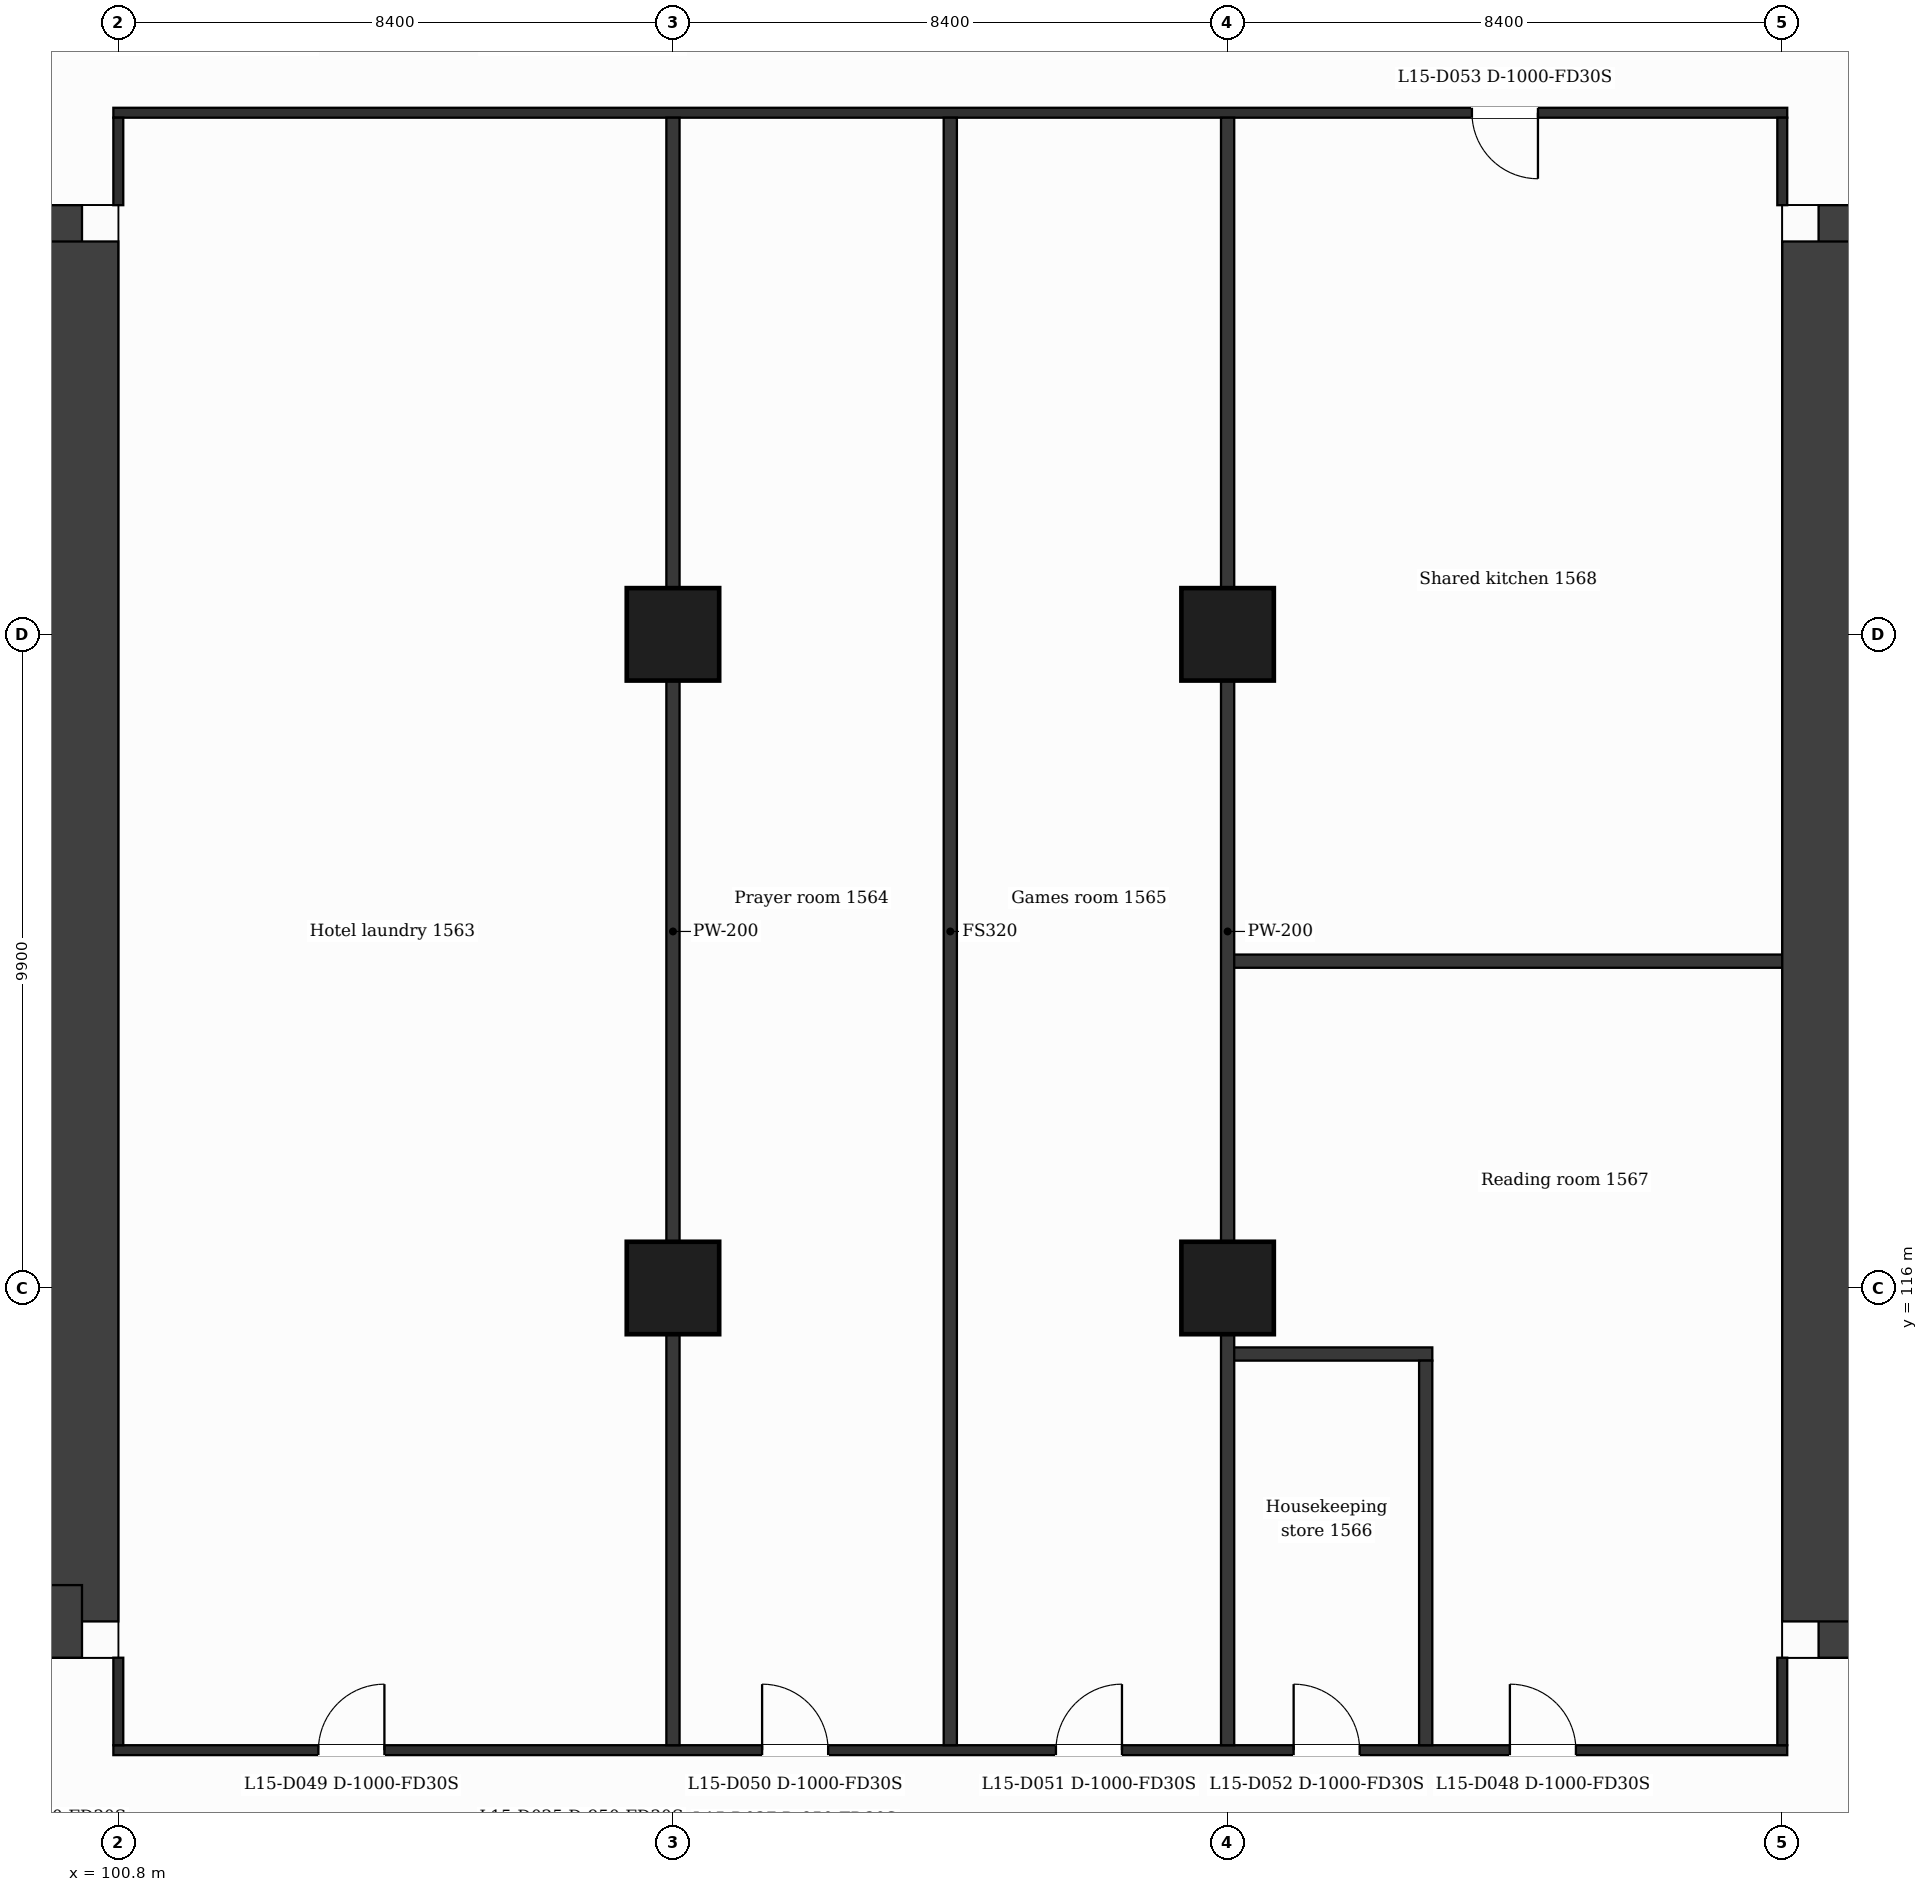
"""IFC4 building model, lengths in metres.
Left out: names, types, materials, properties, quantities, classifications, styles, units other than length and angle.
Written with IfcOpenShell. Run it as: python <this file> out.ifc"""

import sys

from ifc_helpers import new_model, si_unit, direction, frame, frame_2d, origin, origin_2d, place, context, subcontext, project, spatial, rectangle, extrude, element, fill, save


model = new_model("IFC4")
c1 = context("Model", 3, precision=1e-05, world=origin(), true_north=direction((0.0, 1.0)))
c2 = subcontext(c1, "Body", "Model", "MODEL_VIEW")
j1 = project(units=[si_unit("LENGTHUNIT", "METRE"), si_unit("PLANEANGLEUNIT", "RADIAN")], contexts=[c1])
p1 = place(None, origin())
s1 = spatial("IfcSite", under=j1, at=p1, CompositionType="ELEMENT")
p2 = place(p1, origin())
s2 = spatial("IfcBuilding", under=s1, at=p2, CompositionType="ELEMENT")
p3 = place(p2, frame((0.0, 0.0, 70.5)))
s3 = spatial("IfcBuildingStorey", under=s2, at=p3, CompositionType="ELEMENT", Elevation=70.5)
p4 = place(p3, frame((89.112, 131.85, 0.0), z_axis=(0.0, 0.0, 1.0), x_axis=(1.0, 0.0, 0.0)))
e1 = element("IfcWall", 1, at=p4, inside=s3, PredefinedType="SHEAR", context=c2, shape_type="SweptSolid", body=[
    extrude(rectangle(XDim=11.138, YDim=1.1, at=frame_2d((5.569, 0.0))), origin(), (0.0, 0.0, 1.0), 3.5),
])
p5 = place(p4, frame((6.552, 0.0, 0.0)))
e2 = element("IfcOpeningElement", 2, at=p5, cuts=e1, PredefinedType="OPENING", context=c2, shape_type="SweptSolid", body=[
    extrude(rectangle(XDim=1.2, YDim=2.1, at=frame_2d((0.6, 1.05))), frame((0.0, 0.56, 0.0), z_axis=(0.0, -1.0, 0.0), x_axis=(1.0, 0.0, 0.0)), (0.0, 0.0, 1.0), 1.12),
])
p6 = place(p3, frame((100.25, 131.85, 0.0), z_axis=(0.0, 0.0, 1.0), x_axis=(0.0, -1.0, 0.0)))
e3 = element("IfcWall", 3, at=p6, inside=s3, PredefinedType="SHEAR", context=c2, shape_type="SweptSolid", body=[
    extrude(rectangle(XDim=20.9, YDim=1.1, at=frame_2d((10.45, 0.0))), origin(), (0.0, 0.0, 1.0), 3.5),
])
p7 = place(p3, frame((100.25, 110.95, 0.0), z_axis=(0.0, 0.0, 1.0), x_axis=(-1.0, 0.0, 0.0)))
e4 = element("IfcWall", 4, at=p7, inside=s3, PredefinedType="SHEAR", context=c2, shape_type="SweptSolid", body=[
    extrude(rectangle(XDim=13.952, YDim=1.1, at=frame_2d((6.976, 0.0))), origin(), (0.0, 0.0, 1.0), 3.5),
])
p8 = place(p7, frame((5.748, 0.0, 0.0)))
e5 = element("IfcOpeningElement", 5, at=p8, cuts=e4, PredefinedType="OPENING", context=c2, shape_type="SweptSolid", body=[
    extrude(rectangle(XDim=1.4, YDim=2.1, at=frame_2d((0.7, 1.05))), frame((0.0, 0.56, 0.0), z_axis=(0.0, -1.0, 0.0), x_axis=(1.0, 0.0, 0.0)), (0.0, 0.0, 1.0), 1.12),
])
p9 = place(p3, frame((126.55, 131.85, 0.0), z_axis=(0.0, 0.0, 1.0), x_axis=(1.0, 0.0, 0.0)))
e6 = element("IfcWall", 6, at=p9, inside=s3, PredefinedType="SHEAR", context=c2, shape_type="SweptSolid", body=[
    extrude(rectangle(XDim=11.138, YDim=1.1, at=frame_2d((5.569, 0.0))), origin(), (0.0, 0.0, 1.0), 3.5),
])
p10 = place(p9, frame((3.386, 0.0, 0.0)))
e7 = element("IfcOpeningElement", 7, at=p10, cuts=e6, PredefinedType="OPENING", context=c2, shape_type="SweptSolid", body=[
    extrude(rectangle(XDim=1.2, YDim=2.1, at=frame_2d((0.6, 1.05))), frame((0.0, 0.56, 0.0), z_axis=(0.0, -1.0, 0.0), x_axis=(1.0, 0.0, 0.0)), (0.0, 0.0, 1.0), 1.12),
])
p11 = place(p3, frame((140.502, 110.95, 0.0), z_axis=(0.0, 0.0, 1.0), x_axis=(-1.0, 0.0, 0.0)))
e8 = element("IfcWall", 8, at=p11, inside=s3, PredefinedType="SHEAR", context=c2, shape_type="SweptSolid", body=[
    extrude(rectangle(XDim=13.952, YDim=1.1, at=frame_2d((6.976, 0.0))), origin(), (0.0, 0.0, 1.0), 3.5),
])
p12 = place(p11, frame((6.804, 0.0, 0.0)))
e9 = element("IfcOpeningElement", 9, at=p12, cuts=e8, PredefinedType="OPENING", context=c2, shape_type="SweptSolid", body=[
    extrude(rectangle(XDim=1.4, YDim=2.1, at=frame_2d((0.7, 1.05))), frame((0.0, 0.56, 0.0), z_axis=(0.0, -1.0, 0.0), x_axis=(1.0, 0.0, 0.0)), (0.0, 0.0, 1.0), 1.12),
])
p13 = place(p3, frame((126.55, 110.95, 0.0), z_axis=(0.0, 0.0, 1.0), x_axis=(0.0, 1.0, 0.0)))
e10 = element("IfcWall", 10, at=p13, inside=s3, PredefinedType="SHEAR", context=c2, shape_type="SweptSolid", body=[
    extrude(rectangle(XDim=20.9, YDim=1.1, at=frame_2d((10.45, 0.0))), origin(), (0.0, 0.0, 1.0), 3.5),
])
for number, where, z_axis, x_axis in (
    (11, (109.2, 116.0, 0.0), (0.0, 0.0, 1.0), (1.0, 0.0, 0.0)),
    (12, (117.6, 116.0, 0.0), (0.0, 0.0, 1.0), (1.0, 0.0, 0.0)),
    (13, (109.2, 125.9, 0.0), (0.0, 0.0, 1.0), (1.0, 0.0, 0.0)),
    (14, (117.6, 125.9, 0.0), (0.0, 0.0, 1.0), (1.0, 0.0, 0.0)),
):
    element("IfcColumn", number, at=place(p3, frame(where, z_axis=z_axis, x_axis=x_axis)), inside=s3, PredefinedType="COLUMN", context=c2, shape_type="SweptSolid", body=[
        extrude(rectangle(XDim=1.4, YDim=1.4, at=origin_2d()), origin(), (0.0, 0.0, 1.0), 3.5),
    ])
p14 = place(p3, frame((100.725, 109.0, 0.0), z_axis=(0.0, 0.0, 1.0), x_axis=(1.0, 0.0, 0.0)))
e15 = element("IfcWall", 15, at=p14, inside=s3, PredefinedType="PARTITIONING", context=c2, shape_type="SweptSolid", body=[
    extrude(rectangle(XDim=25.35, YDim=0.15, at=frame_2d((12.675, 0.0))), origin(), (0.0, 0.0, 1.0), 3.18),
])
p15 = place(p14, frame((21.15, 0.0, 0.0)))
e16 = element("IfcOpeningElement", 16, at=p15, cuts=e15, PredefinedType="OPENING", context=c2, shape_type="SweptSolid", body=[
    extrude(rectangle(XDim=1.0, YDim=2.1, at=frame_2d((0.5, 1.05))), frame((0.0, 0.085, 0.0), z_axis=(0.0, -1.0, 0.0), x_axis=(1.0, 0.0, 0.0)), (0.0, 0.0, 1.0), 0.17),
])
p16 = place(p14, frame((3.105, 0.0, 0.0)))
e17 = element("IfcOpeningElement", 17, at=p16, cuts=e15, PredefinedType="OPENING", context=c2, shape_type="SweptSolid", body=[
    extrude(rectangle(XDim=1.0, YDim=2.1, at=frame_2d((0.5, 1.05))), frame((0.0, 0.085, 0.0), z_axis=(0.0, -1.0, 0.0), x_axis=(1.0, 0.0, 0.0)), (0.0, 0.0, 1.0), 0.17),
])
p17 = place(p14, frame((9.825, 0.0, 0.0)))
e18 = element("IfcOpeningElement", 18, at=p17, cuts=e15, PredefinedType="OPENING", context=c2, shape_type="SweptSolid", body=[
    extrude(rectangle(XDim=1.0, YDim=2.1, at=frame_2d((0.5, 1.05))), frame((0.0, 0.085, 0.0), z_axis=(0.0, -1.0, 0.0), x_axis=(1.0, 0.0, 0.0)), (0.0, 0.0, 1.0), 0.17),
])
p18 = place(p14, frame((14.275, 0.0, 0.0)))
e19 = element("IfcOpeningElement", 19, at=p18, cuts=e15, PredefinedType="OPENING", context=c2, shape_type="SweptSolid", body=[
    extrude(rectangle(XDim=1.0, YDim=2.1, at=frame_2d((0.5, 1.05))), frame((0.0, 0.085, 0.0), z_axis=(0.0, -1.0, 0.0), x_axis=(1.0, 0.0, 0.0)), (0.0, 0.0, 1.0), 0.17),
])
p19 = place(p14, frame((17.875, 0.0, 0.0)))
e20 = element("IfcOpeningElement", 20, at=p19, cuts=e15, PredefinedType="OPENING", context=c2, shape_type="SweptSolid", body=[
    extrude(rectangle(XDim=1.0, YDim=2.1, at=frame_2d((0.5, 1.05))), frame((0.0, 0.085, 0.0), z_axis=(0.0, -1.0, 0.0), x_axis=(1.0, 0.0, 0.0)), (0.0, 0.0, 1.0), 0.17),
])
p20 = place(p3, frame((117.6, 115.0, 0.0), z_axis=(0.0, 0.0, 1.0), x_axis=(1.0, 0.0, 0.0)))
e21 = element("IfcWall", 21, at=p20, inside=s3, PredefinedType="PARTITIONING", context=c2, shape_type="SweptSolid", body=[
    extrude(rectangle(XDim=3.1, YDim=0.2, at=frame_2d((1.55, 0.0))), origin(), (0.0, 0.0, 1.0), 3.18),
])
p21 = place(p3, frame((117.6, 120.95, 0.0), z_axis=(0.0, 0.0, 1.0), x_axis=(1.0, 0.0, 0.0)))
e22 = element("IfcWall", 22, at=p21, inside=s3, PredefinedType="PARTITIONING", context=c2, shape_type="SweptSolid", body=[
    extrude(rectangle(XDim=8.4, YDim=0.2, at=frame_2d((4.2, 0.0))), origin(), (0.0, 0.0, 1.0), 3.18),
])
p22 = place(p3, frame((100.725, 133.8, 0.0), z_axis=(0.0, 0.0, 1.0), x_axis=(1.0, 0.0, 0.0)))
e23 = element("IfcWall", 23, at=p22, inside=s3, PredefinedType="PARTITIONING", context=c2, shape_type="SweptSolid", body=[
    extrude(rectangle(XDim=25.35, YDim=0.15, at=frame_2d((12.675, 0.0))), origin(), (0.0, 0.0, 1.0), 3.18),
])
p23 = place(p22, frame((20.575, 0.0, 0.0)))
e24 = element("IfcOpeningElement", 24, at=p23, cuts=e23, PredefinedType="OPENING", context=c2, shape_type="SweptSolid", body=[
    extrude(rectangle(XDim=1.0, YDim=2.1, at=frame_2d((0.5, 1.05))), frame((0.0, 0.085, 0.0), z_axis=(0.0, -1.0, 0.0), x_axis=(1.0, 0.0, 0.0)), (0.0, 0.0, 1.0), 0.17),
])
p24 = place(p3, frame((100.8, 109.075, 0.0), z_axis=(0.0, 0.0, 1.0), x_axis=(0.0, 1.0, 0.0)))
e25 = element("IfcWall", 25, at=p24, inside=s3, PredefinedType="PARTITIONING", context=c2, shape_type="SweptSolid", body=[
    extrude(rectangle(XDim=1.325, YDim=0.15, at=frame_2d((0.663, 0.0))), origin(), (0.0, 0.0, 1.0), 3.18),
])
p25 = place(p3, frame((100.8, 132.4, 0.0), z_axis=(0.0, 0.0, 1.0), x_axis=(0.0, 1.0, 0.0)))
e26 = element("IfcWall", 26, at=p25, inside=s3, PredefinedType="PARTITIONING", context=c2, shape_type="SweptSolid", body=[
    extrude(rectangle(XDim=1.325, YDim=0.15, at=frame_2d((0.663, 0.0))), origin(), (0.0, 0.0, 1.0), 3.18),
])
for number, where, z_axis, x_axis in (
    (27, (109.2, 109.075, 0.0), (0.0, 0.0, 1.0), (0.0, 1.0, 0.0)),
    (28, (113.4, 109.075, 0.0), (0.0, 0.0, 1.0), (0.0, 1.0, 0.0)),
    (29, (117.6, 109.075, 0.0), (0.0, 0.0, 1.0), (0.0, 1.0, 0.0)),
):
    element("IfcWall", number, at=place(p3, frame(where, z_axis=z_axis, x_axis=x_axis)), inside=s3, PredefinedType="PARTITIONING", context=c2, shape_type="SweptSolid", body=[
        extrude(rectangle(XDim=24.65, YDim=0.2, at=frame_2d((12.325, 0.0))), origin(), (0.0, 0.0, 1.0), 3.18),
    ])
p26 = place(p3, frame((120.6, 109.075, 0.0), z_axis=(0.0, 0.0, 1.0), x_axis=(0.0, 1.0, 0.0)))
e30 = element("IfcWall", 30, at=p26, inside=s3, PredefinedType="PARTITIONING", context=c2, shape_type="SweptSolid", body=[
    extrude(rectangle(XDim=5.825, YDim=0.2, at=frame_2d((2.913, 0.0))), origin(), (0.0, 0.0, 1.0), 3.18),
])
p27 = place(p3, frame((126.0, 109.075, 0.0), z_axis=(0.0, 0.0, 1.0), x_axis=(0.0, 1.0, 0.0)))
e31 = element("IfcWall", 31, at=p27, inside=s3, PredefinedType="PARTITIONING", context=c2, shape_type="SweptSolid", body=[
    extrude(rectangle(XDim=1.325, YDim=0.15, at=frame_2d((0.663, 0.0))), origin(), (0.0, 0.0, 1.0), 3.18),
])
p28 = place(p3, frame((126.0, 132.4, 0.0), z_axis=(0.0, 0.0, 1.0), x_axis=(0.0, 1.0, 0.0)))
e32 = element("IfcWall", 32, at=p28, inside=s3, PredefinedType="PARTITIONING", context=c2, shape_type="SweptSolid", body=[
    extrude(rectangle(XDim=1.325, YDim=0.15, at=frame_2d((0.663, 0.0))), origin(), (0.0, 0.0, 1.0), 3.18),
])
p29 = place(p15, origin())
e33 = element("IfcDoor", 33, at=p29, inside=s3, OperationType="SINGLE_SWING_LEFT", PredefinedType="DOOR", context=c2, shape_type="SweptSolid", body=[
    extrude(rectangle(XDim=1.0, YDim=2.1, at=frame_2d((0.5, 1.05))), frame((0.0, 0.025, 0.0), z_axis=(0.0, -1.0, 0.0), x_axis=(1.0, 0.0, 0.0)), (0.0, 0.0, 1.0), 0.05),
])
fill(e16, e33)
p30 = place(p16, origin())
e34 = element("IfcDoor", 34, at=p30, inside=s3, OperationType="SINGLE_SWING_RIGHT", PredefinedType="DOOR", context=c2, shape_type="SweptSolid", body=[
    extrude(rectangle(XDim=1.0, YDim=2.1, at=frame_2d((0.5, 1.05))), frame((0.0, 0.025, 0.0), z_axis=(0.0, -1.0, 0.0), x_axis=(1.0, 0.0, 0.0)), (0.0, 0.0, 1.0), 0.05),
])
fill(e17, e34)
p31 = place(p17, origin())
e35 = element("IfcDoor", 35, at=p31, inside=s3, OperationType="SINGLE_SWING_LEFT", PredefinedType="DOOR", context=c2, shape_type="SweptSolid", body=[
    extrude(rectangle(XDim=1.0, YDim=2.1, at=frame_2d((0.5, 1.05))), frame((0.0, 0.025, 0.0), z_axis=(0.0, -1.0, 0.0), x_axis=(1.0, 0.0, 0.0)), (0.0, 0.0, 1.0), 0.05),
])
fill(e18, e35)
p32 = place(p18, origin())
e36 = element("IfcDoor", 36, at=p32, inside=s3, OperationType="SINGLE_SWING_RIGHT", PredefinedType="DOOR", context=c2, shape_type="SweptSolid", body=[
    extrude(rectangle(XDim=1.0, YDim=2.1, at=frame_2d((0.5, 1.05))), frame((0.0, 0.025, 0.0), z_axis=(0.0, -1.0, 0.0), x_axis=(1.0, 0.0, 0.0)), (0.0, 0.0, 1.0), 0.05),
])
fill(e19, e36)
p33 = place(p19, origin())
e37 = element("IfcDoor", 37, at=p33, inside=s3, OperationType="SINGLE_SWING_LEFT", PredefinedType="DOOR", context=c2, shape_type="SweptSolid", body=[
    extrude(rectangle(XDim=1.0, YDim=2.1, at=frame_2d((0.5, 1.05))), frame((0.0, 0.025, 0.0), z_axis=(0.0, -1.0, 0.0), x_axis=(1.0, 0.0, 0.0)), (0.0, 0.0, 1.0), 0.05),
])
fill(e20, e37)
p34 = place(p23, origin())
e38 = element("IfcDoor", 38, at=p34, inside=s3, OperationType="SINGLE_SWING_RIGHT", PredefinedType="DOOR", context=c2, shape_type="SweptSolid", body=[
    extrude(rectangle(XDim=1.0, YDim=2.1, at=frame_2d((0.5, 1.05))), frame((0.0, 0.025, 0.0), z_axis=(0.0, -1.0, 0.0), x_axis=(1.0, 0.0, 0.0)), (0.0, 0.0, 1.0), 0.05),
])
fill(e24, e38)
save(model, sys.argv[1])
